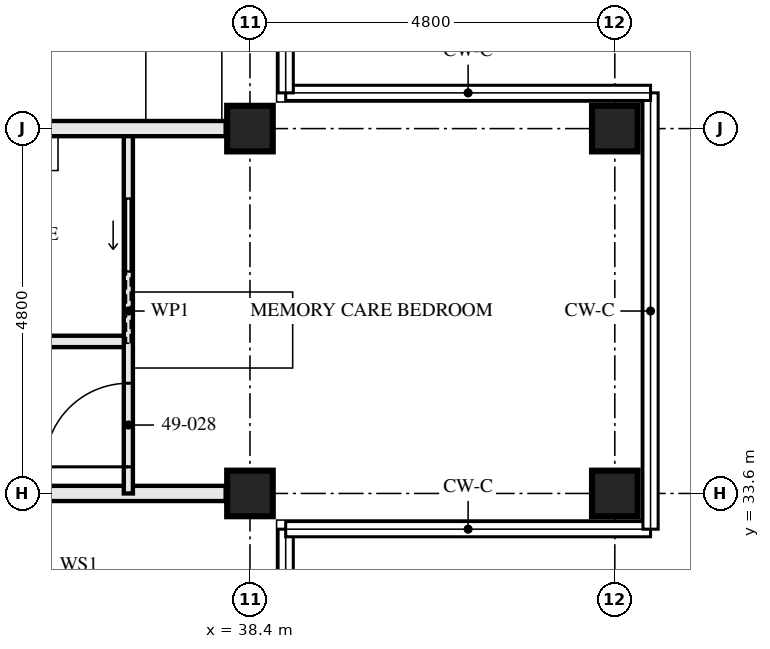
"""IFC4 building model, lengths in metres.
Left out: names, types, materials, properties, quantities, classifications, styles, units other than length and angle.
Written with IfcOpenShell. Run it as: python <this file> out.ifc"""

import sys

from ifc_helpers import new_model, si_unit, direction, frame, frame_2d, origin, origin_2d, place, context, subcontext, project, spatial, rectangle, hollow_rectangle, extrude, element, fill, save


model = new_model("IFC4")
c1 = context("Model", 3, precision=1e-05, world=origin(), true_north=direction((0.0, 1.0)))
c2 = subcontext(c1, "Body", "Model", "MODEL_VIEW")
j1 = project(units=[si_unit("LENGTHUNIT", "METRE"), si_unit("PLANEANGLEUNIT", "RADIAN")], contexts=[c1])
p1 = place(None, origin())
s1 = spatial("IfcSite", under=j1, at=p1, CompositionType="ELEMENT")
p2 = place(p1, origin())
s2 = spatial("IfcBuilding", under=s1, at=p2, CompositionType="ELEMENT")
p3 = place(p2, frame((0.0, 0.0, 179.5)))
s3 = spatial("IfcBuildingStorey", under=s2, at=p3, CompositionType="ELEMENT", Elevation=179.5)
for number, where, z_axis, x_axis in (
    (1, (38.4, 33.6, 0.0), (0.0, 0.0, 1.0), (0.0, 1.0, 0.0)),
    (2, (38.4, 38.4, 0.0), (0.0, 0.0, 1.0), (0.0, 1.0, 0.0)),
    (3, (43.2, 33.6, 0.0), (0.0, 0.0, 1.0), (0.0, 1.0, 0.0)),
    (4, (43.2, 38.4, 0.0), (0.0, 0.0, 1.0), (0.0, 1.0, 0.0)),
):
    element("IfcColumn", number, at=place(p3, frame(where, z_axis=z_axis, x_axis=x_axis)), inside=s3, PredefinedType="COLUMN", context=c2, shape_type="SweptSolid", body=[
        extrude(hollow_rectangle(XDim=0.6, YDim=0.6, WallThickness=0.08, at=origin_2d()), origin(), (0.0, 0.0, 1.0), 3.5),
    ])
p4 = place(p3, frame((38.08, 33.6, 0.0), z_axis=(0.0, 0.0, 1.0), x_axis=(-1.0, 0.0, 0.0)))
e5 = element("IfcWall", 5, at=p4, inside=s3, PredefinedType="PARTITIONING", context=c2, shape_type="SweptSolid", body=[
    extrude(rectangle(XDim=7.28, YDim=0.2, at=frame_2d((3.64, 0.0))), origin(), (0.0, 0.0, 1.0), 2.55),
])
p5 = place(p3, frame((36.8, 35.6, 0.0), z_axis=(0.0, 0.0, 1.0), x_axis=(-1.0, 0.0, 0.0)))
e6 = element("IfcWall", 6, at=p5, inside=s3, PredefinedType="PARTITIONING", context=c2, shape_type="SweptSolid", body=[
    extrude(rectangle(XDim=3.0, YDim=0.15, at=frame_2d((1.5, 0.0))), origin(), (0.0, 0.0, 1.0), 3.33),
])
p6 = place(p3, frame((36.8, 33.6, 0.0), z_axis=(0.0, 0.0, 1.0), x_axis=(0.0, 1.0, 0.0)))
e7 = element("IfcWall", 7, at=p6, inside=s3, PredefinedType="PARTITIONING", context=c2, shape_type="SweptSolid", body=[
    extrude(rectangle(XDim=4.8, YDim=0.12, at=frame_2d((2.4, 0.0))), origin(), (0.0, 0.0, 1.0), 3.33),
])
p7 = place(p6, frame((0.35, 0.0, 0.0)))
e8 = element("IfcOpeningElement", 8, at=p7, cuts=e7, PredefinedType="OPENING", context=c2, shape_type="SweptSolid", body=[
    extrude(rectangle(XDim=1.1, YDim=2.1, at=frame_2d((0.55, 1.05))), frame((0.0, 0.071, 0.0), z_axis=(0.0, -1.0, 0.0), x_axis=(1.0, 0.0, 0.0)), (0.0, 0.0, 1.0), 0.141),
])
p8 = place(p6, frame((2.925, 0.0, 0.0)))
e9 = element("IfcOpeningElement", 9, at=p8, cuts=e7, PredefinedType="OPENING", context=c2, shape_type="SweptSolid", body=[
    extrude(rectangle(XDim=0.95, YDim=2.1, at=frame_2d((0.475, 1.05))), frame((0.0, 0.071, 0.0), z_axis=(0.0, -1.0, 0.0), x_axis=(1.0, 0.0, 0.0)), (0.0, 0.0, 1.0), 0.141),
])
p9 = place(p3, frame((38.08, 38.4, 0.0), z_axis=(0.0, 0.0, 1.0), x_axis=(-1.0, 0.0, 0.0)))
e10 = element("IfcWall", 10, at=p9, inside=s3, PredefinedType="PARTITIONING", context=c2, shape_type="SweptSolid", body=[
    extrude(rectangle(XDim=7.28, YDim=0.2, at=frame_2d((3.64, 0.0))), origin(), (0.0, 0.0, 1.0), 2.55),
])
p10 = place(p7, origin())
e11 = element("IfcDoor", 11, at=p10, inside=s3, OperationType="SINGLE_SWING_RIGHT", PredefinedType="DOOR", context=c2, shape_type="SweptSolid", body=[
    extrude(rectangle(XDim=1.1, YDim=2.1, at=frame_2d((0.55, 1.05))), frame((0.0, 0.022, 0.0), z_axis=(0.0, -1.0, 0.0), x_axis=(1.0, 0.0, 0.0)), (0.0, 0.0, 1.0), 0.044),
])
fill(e8, e11)
p11 = place(p8, origin())
e12 = element("IfcDoor", 12, at=p11, inside=s3, OperationType="SLIDING_TO_RIGHT", PredefinedType="DOOR", context=c2, shape_type="SweptSolid", body=[
    extrude(rectangle(XDim=0.95, YDim=2.1, at=frame_2d((0.475, 1.05))), frame((0.0, 0.022, 0.0), z_axis=(0.0, -1.0, 0.0), x_axis=(1.0, 0.0, 0.0)), (0.0, 0.0, 1.0), 0.044),
])
fill(e9, e12)
save(model, sys.argv[1])
